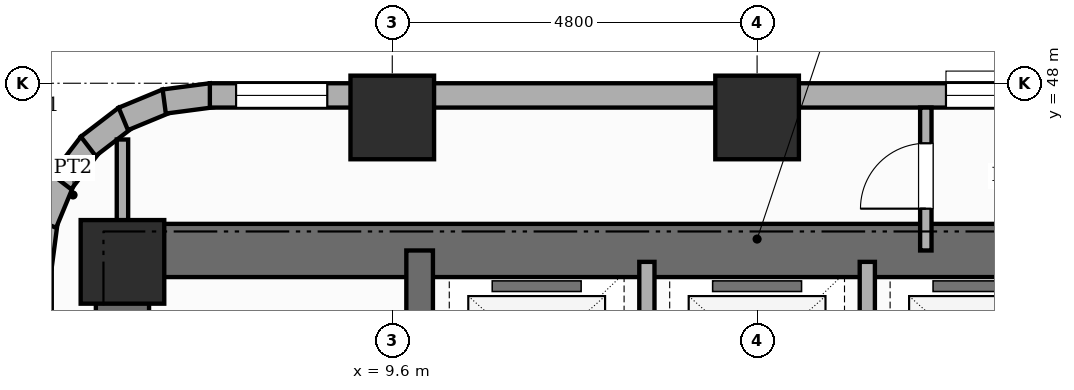
"""IFC4 building model, lengths in metres.
Left out: names, types, materials, properties, quantities, classifications, styles, units other than length and angle.
Written with IfcOpenShell. Run it as: python <this file> out.ifc"""

import sys

from ifc_helpers import new_model, si_unit, direction, frame, frame_2d, origin, origin_2d, place, context, subcontext, project, spatial, rectangle, extrude, element, fill, save


model = new_model("IFC4")
c1 = context("Model", 3, precision=1e-05, world=origin(), true_north=direction((0.0, 1.0)))
c2 = subcontext(c1, "Body", "Model", "MODEL_VIEW")
j1 = project(units=[si_unit("LENGTHUNIT", "METRE"), si_unit("PLANEANGLEUNIT", "RADIAN")], contexts=[c1])
p1 = place(None, origin())
s1 = spatial("IfcSite", under=j1, at=p1, CompositionType="ELEMENT")
p2 = place(p1, origin())
s2 = spatial("IfcBuilding", under=s1, at=p2, CompositionType="ELEMENT")
p3 = place(p2, frame((0.0, 0.0, 97.0)))
s3 = spatial("IfcBuildingStorey", under=s2, at=p3, CompositionType="ELEMENT", Elevation=97.0)
p4 = place(p3, frame((6.05, 30.55, 0.0), z_axis=(0.0, 0.0, 1.0), x_axis=(0.0, 1.0, 0.0)))
e1 = element("IfcWall", 1, at=p4, inside=s3, PredefinedType="SHEAR", context=c2, shape_type="SweptSolid", body=[
    extrude(rectangle(XDim=15.6, YDim=0.7, at=frame_2d((7.8, 0.0))), origin(), (0.0, 0.0, 1.0), 4.8),
])
p5 = place(p3, frame((6.05, 45.8, 0.0), z_axis=(0.0, 0.0, 1.0), x_axis=(1.0, 0.0, 0.0)))
e2 = element("IfcWall", 2, at=p5, inside=s3, PredefinedType="SHEAR", context=c2, shape_type="SweptSolid", body=[
    extrude(rectangle(XDim=16.7, YDim=0.7, at=frame_2d((8.35, 0.0))), origin(), (0.0, 0.0, 1.0), 4.8),
])
p6 = place(p3, frame((9.96, 30.9, 0.0), z_axis=(0.0, 0.0, 1.0), x_axis=(0.0, 1.0, 0.0)))
e3 = element("IfcWall", 3, at=p6, inside=s3, PredefinedType="SHEAR", context=c2, shape_type="SweptSolid", body=[
    extrude(rectangle(XDim=14.9, YDim=0.35, at=frame_2d((7.45, 0.0))), origin(), (0.0, 0.0, 1.0), 4.8),
])
p7 = place(p6, frame((0.65, 0.0, 0.0)))
e4 = element("IfcOpeningElement", 4, at=p7, cuts=e3, PredefinedType="OPENING", context=c2, shape_type="SweptSolid", body=[
    extrude(rectangle(XDim=0.95, YDim=2.1, at=frame_2d((0.475, 1.05))), frame((0.0, 0.185, 0.0), z_axis=(0.0, -1.0, 0.0), x_axis=(1.0, 0.0, 0.0)), (0.0, 0.0, 1.0), 0.37),
])
p8 = place(p6, frame((10.45, 0.0, 0.0)))
e5 = element("IfcOpeningElement", 5, at=p8, cuts=e3, PredefinedType="OPENING", context=c2, shape_type="SweptSolid", body=[
    extrude(rectangle(XDim=1.0, YDim=2.15, at=frame_2d((0.5, 1.075))), frame((0.0, 0.185, 0.0), z_axis=(0.0, -1.0, 0.0), x_axis=(1.0, 0.0, 0.0)), (0.0, 0.0, 1.0), 0.37),
])
for number, where, z_axis, x_axis in (
    (6, (6.05, 45.65, 0.0), (0.0, 0.0, 1.0), (1.0, 0.0, 0.0)),
    (7, (9.6, 47.55, 0.0), (0.0, 0.0, 1.0), (1.0, 0.0, 0.0)),
    (8, (14.4, 47.55, 0.0), (0.0, 0.0, 1.0), (1.0, 0.0, 0.0)),
):
    element("IfcColumn", number, at=place(p3, frame(where, z_axis=z_axis, x_axis=x_axis)), inside=s3, PredefinedType="COLUMN", context=c2, shape_type="SweptSolid", body=[
        extrude(rectangle(XDim=1.1, YDim=1.1, at=origin_2d()), origin(), (0.0, 0.0, 1.0), 4.8),
    ])
for number, where, z_axis, x_axis in (
    (9, (4.958, 45.579, 0.0), (0.0, 0.0, 1.0), (0.131, 0.991, 0.0)),
    (10, (5.03, 46.16, 0.0), (0.0, 0.0, 1.0), (0.383, 0.924, 0.0)),
):
    element("IfcWall", number, at=place(p3, frame(where, z_axis=z_axis, x_axis=x_axis)), inside=s3, PredefinedType="STANDARD", context=c2, shape_type="SweptSolid", body=[
        extrude(rectangle(XDim=0.626, YDim=0.32, at=frame_2d((0.313, 0.0))), origin(), (0.0, 0.0, 1.0), 4.5),
    ])
p9 = place(p3, frame((5.248, 46.703, 0.0), z_axis=(0.0, 0.0, 1.0), x_axis=(0.608938521285, 0.7932174212, 0.0)))
e11 = element("IfcWall", 11, at=p9, inside=s3, PredefinedType="STANDARD", context=c2, shape_type="SweptSolid", body=[
    extrude(rectangle(XDim=0.627, YDim=0.32, at=frame_2d((0.313, 0.0))), origin(), (0.0, 0.0, 1.0), 4.5),
])
p10 = place(p3, frame((5.6, 47.17, 0.0), z_axis=(0.0, 0.0, 1.0), x_axis=(0.793405610854, 0.608693302629, 0.0)))
e12 = element("IfcWall", 12, at=p10, inside=s3, PredefinedType="STANDARD", context=c2, shape_type="SweptSolid", body=[
    extrude(rectangle(XDim=0.626, YDim=0.32, at=frame_2d((0.313, 0.0))), origin(), (0.0, 0.0, 1.0), 4.5),
])
p11 = place(p3, frame((6.061, 47.531, 0.0), z_axis=(0.0, 0.0, 1.0), x_axis=(0.923836271867, 0.382787856107, 0.0)))
e13 = element("IfcWall", 13, at=p11, inside=s3, PredefinedType="STANDARD", context=c2, shape_type="SweptSolid", body=[
    extrude(rectangle(XDim=0.626, YDim=0.32, at=frame_2d((0.313, 0.0))), origin(), (0.0, 0.0, 1.0), 4.5),
])
p12 = place(p3, frame((6.6, 47.76, 0.0), z_axis=(0.0, 0.0, 1.0), x_axis=(0.991447664465, 0.130504898859, 0.0)))
e14 = element("IfcWall", 14, at=p12, inside=s3, PredefinedType="STANDARD", context=c2, shape_type="SweptSolid", body=[
    extrude(rectangle(XDim=0.627, YDim=0.32, at=frame_2d((0.313, 0.0))), origin(), (0.0, 0.0, 1.0), 4.5),
])
p13 = place(p3, frame((7.2, 47.84, 0.0), z_axis=(0.0, 0.0, 1.0), x_axis=(1.0, 0.0, 0.0)))
e15 = element("IfcWall", 15, at=p13, inside=s3, PredefinedType="STANDARD", context=c2, shape_type="SweptSolid", body=[
    extrude(rectangle(XDim=43.2, YDim=0.32, at=frame_2d((21.6, 0.0))), origin(), (0.0, 0.0, 1.0), 3.68),
])
p14 = place(p13, frame((18.765, 0.0, 0.8)))
e16 = element("IfcOpeningElement", 16, at=p14, cuts=e15, PredefinedType="OPENING", context=c2, shape_type="SweptSolid", body=[
    extrude(rectangle(XDim=1.8, YDim=2.1, at=frame_2d((0.9, 1.05))), frame((0.0, 0.17, 0.0), z_axis=(0.0, -1.0, 0.0), x_axis=(1.0, 0.0, 0.0)), (0.0, 0.0, 1.0), 0.34),
])
p15 = place(p13, frame((0.345, 0.0, 0.8)))
e17 = element("IfcOpeningElement", 17, at=p15, cuts=e15, PredefinedType="OPENING", context=c2, shape_type="SweptSolid", body=[
    extrude(rectangle(XDim=1.2, YDim=1.8, at=frame_2d((0.6, 0.9))), frame((0.0, 0.17, 0.0), z_axis=(0.0, -1.0, 0.0), x_axis=(1.0, 0.0, 0.0)), (0.0, 0.0, 1.0), 0.34),
])
p16 = place(p13, frame((9.685, 0.0, 0.8)))
e18 = element("IfcOpeningElement", 18, at=p16, cuts=e15, PredefinedType="OPENING", context=c2, shape_type="SweptSolid", body=[
    extrude(rectangle(XDim=1.5, YDim=2.1, at=frame_2d((0.75, 1.05))), frame((0.0, 0.17, 0.0), z_axis=(0.0, -1.0, 0.0), x_axis=(1.0, 0.0, 0.0)), (0.0, 0.0, 1.0), 0.34),
])
for number, where, z_axis, x_axis in (
    (19, (12.95, 43.1, 0.0), (0.0, 0.0, 1.0), (0.0, 1.0, 0.0)),
    (20, (15.85, 43.1, 0.0), (0.0, 0.0, 1.0), (0.0, 1.0, 0.0)),
):
    element("IfcWall", number, at=place(p3, frame(where, z_axis=z_axis, x_axis=x_axis)), inside=s3, PredefinedType="POLYGONAL", context=c2, shape_type="SweptSolid", body=[
        extrude(rectangle(XDim=2.55, YDim=0.2, at=frame_2d((1.275, 0.0))), origin(), (0.0, 0.0, 1.0), 4.5),
    ])
p17 = place(p3, frame((6.05, 45.8, 0.0), z_axis=(0.0, 0.0, 1.0), x_axis=(0.0, 1.0, 0.0)))
e21 = element("IfcWall", 21, at=p17, inside=s3, PredefinedType="PARTITIONING", context=c2, shape_type="SweptSolid", body=[
    extrude(rectangle(XDim=1.46, YDim=0.15, at=frame_2d((0.73, 0.0))), origin(), (0.0, 0.0, 1.0), 4.5),
])
p18 = place(p3, frame((16.62, 45.8, 0.0), z_axis=(0.0, 0.0, 1.0), x_axis=(0.0, 1.0, 0.0)))
e22 = element("IfcWall", 22, at=p18, inside=s3, PredefinedType="PARTITIONING", context=c2, shape_type="SweptSolid", body=[
    extrude(rectangle(XDim=1.88, YDim=0.15, at=frame_2d((0.94, 0.0))), origin(), (0.0, 0.0, 1.0), 4.5),
])
p19 = place(p18, frame((0.55, 0.0, 0.0)))
e23 = element("IfcOpeningElement", 23, at=p19, cuts=e22, PredefinedType="OPENING", context=c2, shape_type="SweptSolid", body=[
    extrude(rectangle(XDim=0.86, YDim=2.1, at=frame_2d((0.43, 1.05))), frame((0.0, 0.085, 0.0), z_axis=(0.0, -1.0, 0.0), x_axis=(1.0, 0.0, 0.0)), (0.0, 0.0, 1.0), 0.17),
])
p20 = place(p15, origin())
e24 = element("IfcWindow", 24, at=p20, inside=s3, PartitioningType="SINGLE_PANEL", PredefinedType="WINDOW", context=c2, shape_type="SweptSolid", body=[
    extrude(rectangle(XDim=1.2, YDim=1.8, at=frame_2d((0.6, 0.9))), frame((0.0, 0.03, 0.0), z_axis=(0.0, -1.0, 0.0), x_axis=(1.0, 0.0, 0.0)), (0.0, 0.0, 1.0), 0.06),
])
fill(e17, e24)
p21 = place(p16, origin())
e25 = element("IfcWindow", 25, at=p21, inside=s3, PartitioningType="SINGLE_PANEL", PredefinedType="WINDOW", context=c2, shape_type="SweptSolid", body=[
    extrude(rectangle(XDim=1.5, YDim=2.1, at=frame_2d((0.75, 1.05))), frame((0.0, 0.03, 0.0), z_axis=(0.0, -1.0, 0.0), x_axis=(1.0, 0.0, 0.0)), (0.0, 0.0, 1.0), 0.06),
])
fill(e18, e25)
p22 = place(p19, origin())
e26 = element("IfcDoor", 26, at=p22, inside=s3, OperationType="SINGLE_SWING_LEFT", PredefinedType="DOOR", context=c2, shape_type="SweptSolid", body=[
    extrude(rectangle(XDim=0.86, YDim=2.1, at=frame_2d((0.43, 1.05))), frame((0.0, 0.025, 0.0), z_axis=(0.0, -1.0, 0.0), x_axis=(1.0, 0.0, 0.0)), (0.0, 0.0, 1.0), 0.05),
])
fill(e23, e26)
save(model, sys.argv[1])
